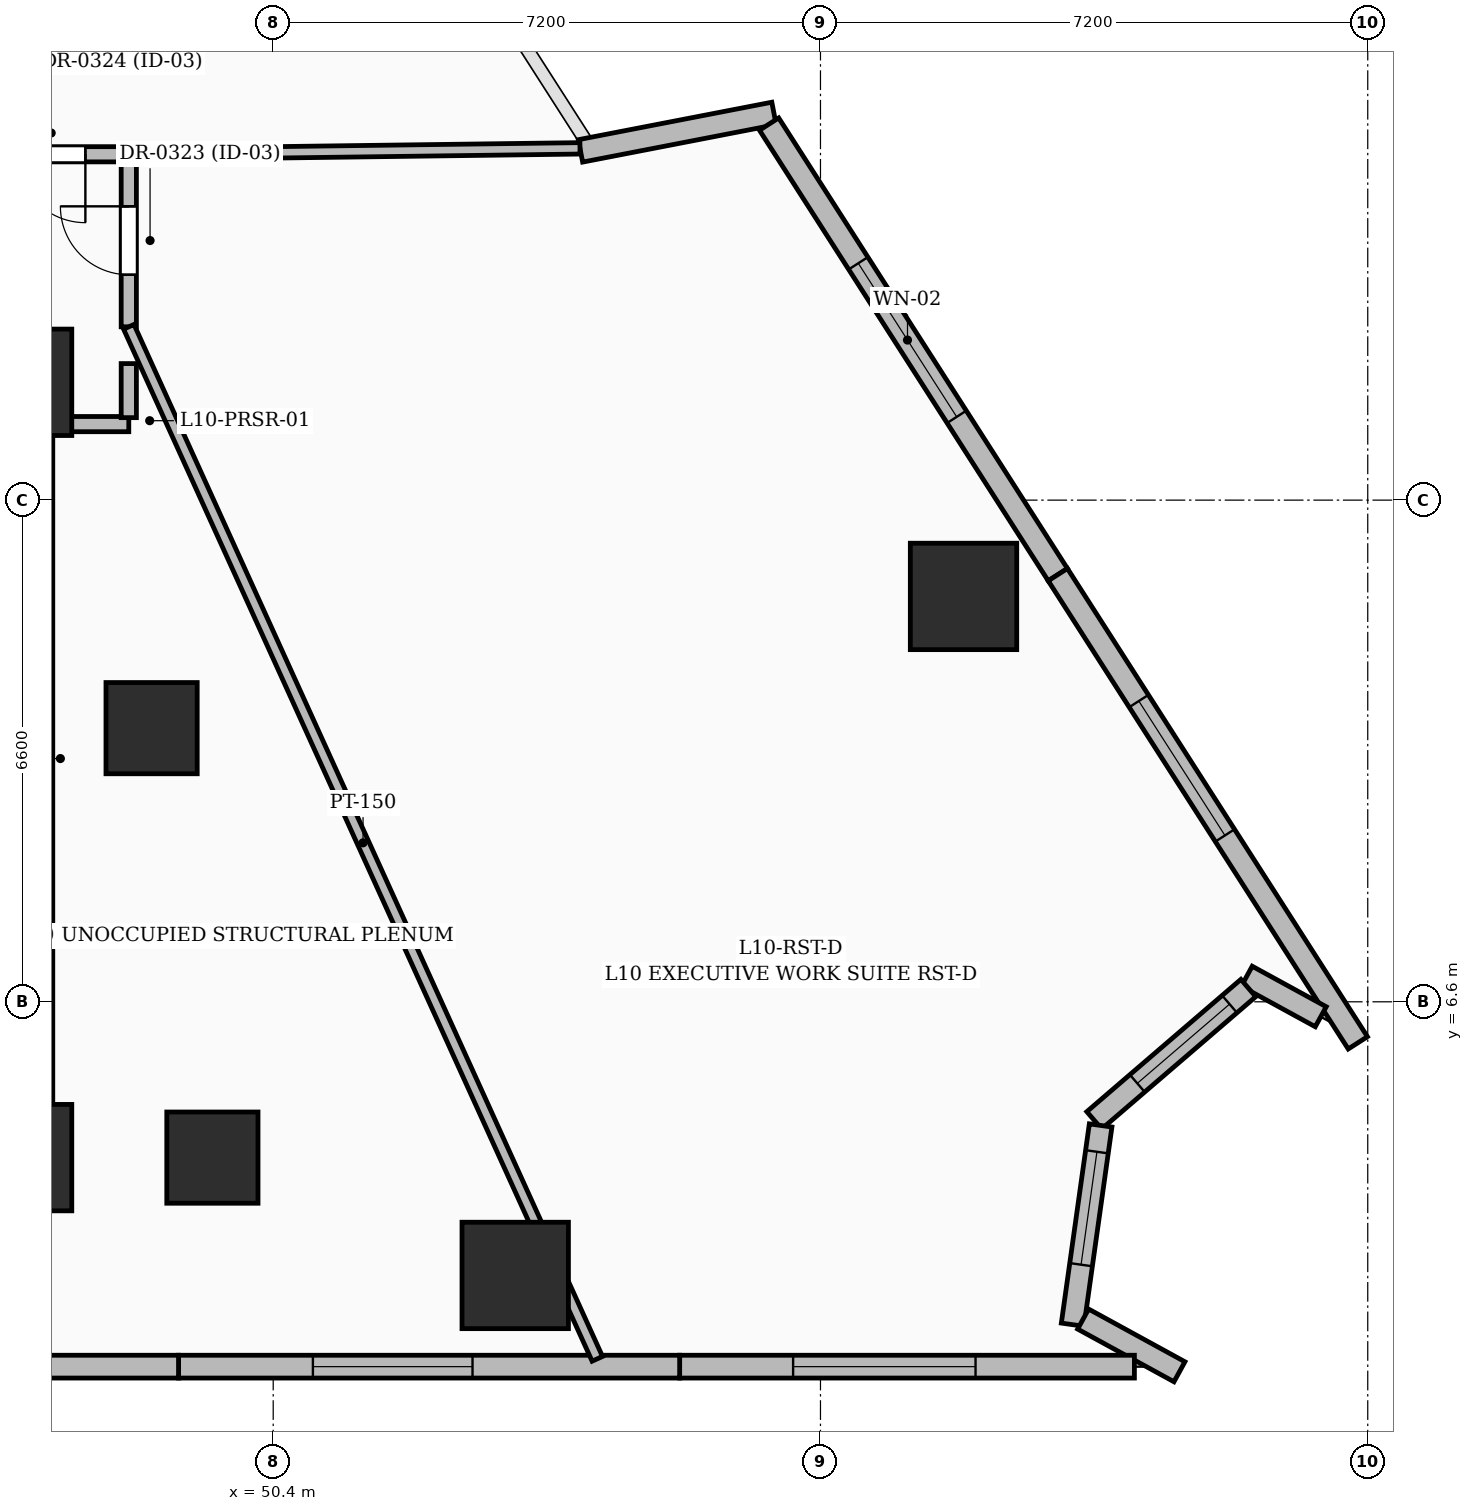
"""IFC4 building model, lengths in metres.
Left out: names, types, materials, properties, quantities, classifications, styles, units other than length and angle.
Written with IfcOpenShell. Run it as: python <this file> out.ifc"""

import sys

from ifc_helpers import new_model, si_unit, direction, frame, frame_2d, origin, origin_2d, place, context, subcontext, project, spatial, rectangle, extrude, element, fill, save


model = new_model("IFC4")
c1 = context("Model", 3, precision=1e-05, world=origin(), true_north=direction((0.0, 1.0)))
c2 = subcontext(c1, "Body", "Model", "MODEL_VIEW")
j1 = project(units=[si_unit("LENGTHUNIT", "METRE"), si_unit("PLANEANGLEUNIT", "RADIAN")], contexts=[c1])
p1 = place(None, origin())
s1 = spatial("IfcSite", under=j1, at=p1, CompositionType="ELEMENT")
p2 = place(p1, origin())
s2 = spatial("IfcBuilding", under=s1, at=p2, CompositionType="ELEMENT")
p3 = place(p2, frame((0.0, 0.0, 46.2)))
s3 = spatial("IfcBuildingStorey", under=s2, at=p3, CompositionType="ELEMENT", Elevation=46.2)
for number, where, z_axis, x_axis in (
    (1, (47.05, 4.55, 0.0), (0.0, 0.0, 1.0), (1.0, 0.0, 0.0)),
    (2, (47.05, 14.75, 0.0), (0.0, 0.0, 1.0), (1.0, 0.0, 0.0)),
):
    element("IfcColumn", number, at=place(p3, frame(where, z_axis=z_axis, x_axis=x_axis)), inside=s3, PredefinedType="COLUMN", context=c2, shape_type="SweptSolid", body=[
        extrude(rectangle(XDim=1.4, YDim=1.4, at=origin_2d()), origin(), (0.0, 0.0, 1.0), 3.6),
    ])
for number, where, z_axis, x_axis in (
    (3, (49.6, 4.55, 0.0), (0.0, 0.0, 1.0), (1.0, 0.0, 0.0)),
    (4, (48.8, 10.2, 0.0), (0.0, 0.0, 1.0), (1.0, 0.0, 0.0)),
):
    element("IfcColumn", number, at=place(p3, frame(where, z_axis=z_axis, x_axis=x_axis)), inside=s3, PredefinedType="COLUMN", context=c2, shape_type="SweptSolid", body=[
        extrude(rectangle(XDim=1.2, YDim=1.2, at=origin_2d()), origin(), (0.0, 0.0, 1.0), 3.6),
    ])
for number, where, z_axis, x_axis in (
    (5, (53.584, 3.0, 0.0), (0.0, 0.0, 1.0), (1.0, 0.0, 0.0)),
    (6, (59.482, 11.933, 0.0), (0.0, 0.0, 1.0), (1.0, 0.0, 0.0)),
):
    element("IfcColumn", number, at=place(p3, frame(where, z_axis=z_axis, x_axis=x_axis)), inside=s3, PredefinedType="COLUMN", context=c2, shape_type="SweptSolid", body=[
        extrude(rectangle(XDim=1.4, YDim=1.4, at=origin_2d()), origin(), (0.0, 0.0, 1.0), 3.6),
    ])
p4 = place(p3, frame((54.443, 17.794, 0.0), z_axis=(0.0, 0.0, 1.0), x_axis=(0.981746971615, 0.190191702567, 0.0)))
e7 = element("IfcWall", 7, at=p4, inside=s3, PredefinedType="SOLIDWALL", context=c2, shape_type="SweptSolid", body=[
    extrude(rectangle(XDim=2.593, YDim=0.3, at=frame_2d((1.296, 0.0))), origin(), (0.0, 0.0, 1.0), 2.375),
])
p5 = place(p3, frame((56.924, 18.147, 0.0), z_axis=(0.0, 0.0, 1.0), x_axis=(0.539524946774, -0.84196961454, 0.0)))
e8 = element("IfcWall", 8, at=p5, inside=s3, PredefinedType="SOLIDWALL", context=c2, shape_type="SweptSolid", body=[
    extrude(rectangle(XDim=7.041, YDim=0.3, at=frame_2d((3.52, 0.0))), origin(), (0.0, 0.0, 1.0), 3.35),
])
p6 = place(p5, frame((2.175, 0.0, 0.6)))
e9 = element("IfcOpeningElement", 9, at=p6, cuts=e8, PredefinedType="OPENING", context=c2, shape_type="SweptSolid", body=[
    extrude(rectangle(XDim=2.4, YDim=2.1, at=frame_2d((1.2, 1.05))), frame((0.0, 0.16, 0.0), z_axis=(0.0, -1.0, 0.0), x_axis=(1.0, 0.0, 0.0)), (0.0, 0.0, 1.0), 0.32),
])
p7 = place(p3, frame((60.722, 12.219, 0.0), z_axis=(0.0, 0.0, 1.0), x_axis=(0.53953753152, -0.841961550239, 0.0)))
e10 = element("IfcWall", 10, at=p7, inside=s3, PredefinedType="SOLIDWALL", context=c2, shape_type="SweptSolid", body=[
    extrude(rectangle(XDim=7.316, YDim=0.3, at=frame_2d((3.658, 0.0))), origin(), (0.0, 0.0, 1.0), 3.35),
])
p8 = place(p7, frame((1.975, 0.0, 0.55)))
e11 = element("IfcOpeningElement", 11, at=p8, cuts=e10, PredefinedType="OPENING", context=c2, shape_type="SweptSolid", body=[
    extrude(rectangle(XDim=2.1, YDim=2.4, at=frame_2d((1.05, 1.2))), frame((0.0, 0.16, 0.0), z_axis=(0.0, -1.0, 0.0), x_axis=(1.0, 0.0, 0.0)), (0.0, 0.0, 1.0), 0.32),
])
p9 = place(p3, frame((64.182, 6.404, 0.0), z_axis=(0.0, 0.0, 1.0), x_axis=(-0.877222032341, 0.48008489455, 0.0)))
e12 = element("IfcWall", 12, at=p9, inside=s3, PredefinedType="SOLIDWALL", context=c2, shape_type="SweptSolid", body=[
    extrude(rectangle(XDim=1.11, YDim=0.3, at=frame_2d((0.555, 0.0))), origin(), (0.0, 0.0, 1.0), 3.35),
])
p10 = place(p3, frame((63.229, 6.781, 0.0), z_axis=(0.0, 0.0, 1.0), x_axis=(-0.7586756687, -0.651468517829, 0.0)))
e13 = element("IfcWall", 13, at=p10, inside=s3, PredefinedType="SOLIDWALL", context=c2, shape_type="SweptSolid", body=[
    extrude(rectangle(XDim=2.671, YDim=0.3, at=frame_2d((1.335, 0.0))), origin(), (0.0, 0.0, 1.0), 3.35),
])
p11 = place(p10, frame((0.325, 0.0, 0.55)))
e14 = element("IfcOpeningElement", 14, at=p11, cuts=e13, PredefinedType="OPENING", context=c2, shape_type="SweptSolid", body=[
    extrude(rectangle(XDim=1.6, YDim=2.2, at=frame_2d((0.8, 1.1))), frame((0.0, 0.16, 0.0), z_axis=(0.0, -1.0, 0.0), x_axis=(1.0, 0.0, 0.0)), (0.0, 0.0, 1.0), 0.32),
])
p12 = place(p3, frame((61.286, 4.973, 0.0), z_axis=(0.0, 0.0, 1.0), x_axis=(-0.139186994148, -0.990266116082, 0.0)))
e15 = element("IfcWall", 15, at=p12, inside=s3, PredefinedType="SOLIDWALL", context=c2, shape_type="SweptSolid", body=[
    extrude(rectangle(XDim=2.647, YDim=0.3, at=frame_2d((1.323, 0.0))), origin(), (0.0, 0.0, 1.0), 3.35),
])
p13 = place(p12, frame((0.35, 0.0, 0.6)))
e16 = element("IfcOpeningElement", 16, at=p13, cuts=e15, PredefinedType="OPENING", context=c2, shape_type="SweptSolid", body=[
    extrude(rectangle(XDim=1.5, YDim=2.1, at=frame_2d((0.75, 1.05))), frame((0.0, 0.16, 0.0), z_axis=(0.0, -1.0, 0.0), x_axis=(1.0, 0.0, 0.0)), (0.0, 0.0, 1.0), 0.32),
])
p14 = place(p3, frame((61.055, 2.426, 0.0), z_axis=(0.0, 0.0, 1.0), x_axis=(0.877287752989, -0.479964788767, 0.0)))
e17 = element("IfcWall", 17, at=p14, inside=s3, PredefinedType="SOLIDWALL", context=c2, shape_type="SweptSolid", body=[
    extrude(rectangle(XDim=1.445, YDim=0.3, at=frame_2d((0.722, 0.0))), origin(), (0.0, 0.0, 1.0), 3.35),
])
p15 = place(p3, frame((61.73, 1.8, 0.0), z_axis=(0.0, 0.0, 1.0), x_axis=(-1.0, 0.0, 0.0)))
e18 = element("IfcWall", 18, at=p15, inside=s3, PredefinedType="SOLIDWALL", context=c2, shape_type="SweptSolid", body=[
    extrude(rectangle(XDim=5.983, YDim=0.3, at=frame_2d((2.991, 0.0))), origin(), (0.0, 0.0, 1.0), 3.35),
])
p16 = place(p15, frame((2.09, 0.0, 0.6)))
e19 = element("IfcOpeningElement", 19, at=p16, cuts=e18, PredefinedType="OPENING", context=c2, shape_type="SweptSolid", body=[
    extrude(rectangle(XDim=2.4, YDim=2.1, at=frame_2d((1.2, 1.05))), frame((0.0, 0.16, 0.0), z_axis=(0.0, -1.0, 0.0), x_axis=(1.0, 0.0, 0.0)), (0.0, 0.0, 1.0), 0.32),
])
p17 = place(p3, frame((55.747, 1.8, 0.0), z_axis=(0.0, 0.0, 1.0), x_axis=(-1.0, 0.0, 0.0)))
e20 = element("IfcWall", 20, at=p17, inside=s3, PredefinedType="SOLIDWALL", context=c2, shape_type="SweptSolid", body=[
    extrude(rectangle(XDim=6.593, YDim=0.3, at=frame_2d((3.296, 0.0))), origin(), (0.0, 0.0, 1.0), 3.35),
])
p18 = place(p17, frame((2.725, 0.0, 0.55)))
e21 = element("IfcOpeningElement", 21, at=p18, cuts=e20, PredefinedType="OPENING", context=c2, shape_type="SweptSolid", body=[
    extrude(rectangle(XDim=2.1, YDim=2.4, at=frame_2d((1.05, 1.2))), frame((0.0, 0.16, 0.0), z_axis=(0.0, -1.0, 0.0), x_axis=(1.0, 0.0, 0.0)), (0.0, 0.0, 1.0), 0.32),
])
p19 = place(p3, frame((49.154, 1.8, 0.0), z_axis=(0.0, 0.0, 1.0), x_axis=(-1.0, 0.0, 0.0)))
e22 = element("IfcWall", 22, at=p19, inside=s3, PredefinedType="SOLIDWALL", context=c2, shape_type="SweptSolid", body=[
    extrude(rectangle(XDim=6.593, YDim=0.3, at=frame_2d((3.296, 0.0))), origin(), (0.0, 0.0, 1.0), 3.35),
])
p20 = place(p19, frame((2.375, 0.0, 0.6)))
e23 = element("IfcOpeningElement", 23, at=p20, cuts=e22, PredefinedType="OPENING", context=c2, shape_type="SweptSolid", body=[
    extrude(rectangle(XDim=1.8, YDim=2.1, at=frame_2d((0.9, 1.05))), frame((0.0, 0.16, 0.0), z_axis=(0.0, -1.0, 0.0), x_axis=(1.0, 0.0, 0.0)), (0.0, 0.0, 1.0), 0.32),
])
p21 = place(p3, frame((47.5, 14.2, 0.0), z_axis=(0.0, 0.0, 1.0), x_axis=(1.0, 0.0, 0.0)))
e24 = element("IfcWall", 24, at=p21, inside=s3, PredefinedType="PARTITIONING", context=c2, shape_type="SweptSolid", body=[
    extrude(rectangle(XDim=1.0, YDim=0.2, at=frame_2d((0.5, 0.0))), origin(), (0.0, 0.0, 1.0), 3.35),
])
p22 = place(p3, frame((48.5, 14.285, 0.0), z_axis=(0.0, 0.0, 1.0), x_axis=(0.0, 1.0, 0.0)))
e25 = element("IfcWall", 25, at=p22, inside=s3, PredefinedType="PARTITIONING", context=c2, shape_type="SweptSolid", body=[
    extrude(rectangle(XDim=0.711, YDim=0.2, at=frame_2d((0.355, 0.0))), origin(), (0.0, 0.0, 1.0), 3.35),
])
p23 = place(p3, frame((48.5, 15.48, 0.0), z_axis=(0.0, 0.0, 1.0), x_axis=(0.0, 1.0, 0.0)))
e26 = element("IfcWall", 26, at=p23, inside=s3, PredefinedType="PARTITIONING", context=c2, shape_type="SweptSolid", body=[
    extrude(rectangle(XDim=2.27, YDim=0.2, at=frame_2d((1.135, 0.0))), origin(), (0.0, 0.0, 1.0), 2.279),
])
p24 = place(p23, frame((0.685, 0.0, 0.0)))
e27 = element("IfcOpeningElement", 27, at=p24, cuts=e26, PredefinedType="OPENING", context=c2, shape_type="SweptSolid", body=[
    extrude(rectangle(XDim=0.9, YDim=2.1, at=frame_2d((0.45, 1.05))), frame((0.0, 0.11, 0.0), z_axis=(0.0, -1.0, 0.0), x_axis=(1.0, 0.0, 0.0)), (0.0, 0.0, 1.0), 0.22),
])
p25 = place(p3, frame((48.415, 17.75, 0.0), z_axis=(0.0, 0.0, 1.0), x_axis=(-1.0, 0.0, 0.0)))
e28 = element("IfcWall", 28, at=p25, inside=s3, PredefinedType="PARTITIONING", context=c2, shape_type="SweptSolid", body=[
    extrude(rectangle(XDim=2.065, YDim=0.2, at=frame_2d((1.032, 0.0))), origin(), (0.0, 0.0, 1.0), 2.86),
])
p26 = place(p25, frame((0.486, 0.0, 0.0)))
e29 = element("IfcOpeningElement", 29, at=p26, cuts=e28, PredefinedType="OPENING", context=c2, shape_type="SweptSolid", body=[
    extrude(rectangle(XDim=0.9, YDim=2.1, at=frame_2d((0.45, 1.05))), frame((0.0, 0.11, 0.0), z_axis=(0.0, -1.0, 0.0), x_axis=(1.0, 0.0, 0.0)), (0.0, 0.0, 1.0), 0.22),
])
p27 = place(p3, frame((54.664, 1.903, 0.0), z_axis=(0.0, 0.0, 1.0), x_axis=(-0.413399508634, 0.910549749471, 0.0)))
e30 = element("IfcWall", 30, at=p27, inside=s3, PredefinedType="PARTITIONING", context=c2, shape_type="SweptSolid", body=[
    extrude(rectangle(XDim=14.911, YDim=0.15, at=frame_2d((7.455, 0.0))), origin(), (0.0, 0.0, 1.0), 2.279),
])
p28 = place(p3, frame((54.436, 17.828, 0.0), z_axis=(0.0, 0.0, 1.0), x_axis=(-0.999914181231, -0.013100769962, 0.0)))
e31 = element("IfcWall", 31, at=p28, inside=s3, PredefinedType="PARTITIONING", context=c2, shape_type="SweptSolid", body=[
    extrude(rectangle(XDim=5.852, YDim=0.15, at=frame_2d((2.926, 0.0))), origin(), (0.0, 0.0, 1.0), 2.279),
])
p29 = place(p6, origin())
e32 = element("IfcWindow", 32, at=p29, inside=s3, PartitioningType="SINGLE_PANEL", PredefinedType="WINDOW", context=c2, shape_type="SweptSolid", body=[
    extrude(rectangle(XDim=2.4, YDim=2.1, at=frame_2d((1.2, 1.05))), frame((0.0, 0.03, 0.0), z_axis=(0.0, -1.0, 0.0), x_axis=(1.0, 0.0, 0.0)), (0.0, 0.0, 1.0), 0.06),
])
fill(e9, e32)
p30 = place(p8, origin())
e33 = element("IfcWindow", 33, at=p30, inside=s3, PartitioningType="SINGLE_PANEL", PredefinedType="WINDOW", context=c2, shape_type="SweptSolid", body=[
    extrude(rectangle(XDim=2.1, YDim=2.4, at=frame_2d((1.05, 1.2))), frame((0.0, 0.03, 0.0), z_axis=(0.0, -1.0, 0.0), x_axis=(1.0, 0.0, 0.0)), (0.0, 0.0, 1.0), 0.06),
])
fill(e11, e33)
p31 = place(p11, origin())
e34 = element("IfcWindow", 34, at=p31, inside=s3, PartitioningType="SINGLE_PANEL", PredefinedType="WINDOW", context=c2, shape_type="SweptSolid", body=[
    extrude(rectangle(XDim=1.6, YDim=2.2, at=frame_2d((0.8, 1.1))), frame((0.0, 0.03, 0.0), z_axis=(0.0, -1.0, 0.0), x_axis=(1.0, 0.0, 0.0)), (0.0, 0.0, 1.0), 0.06),
])
fill(e14, e34)
p32 = place(p13, origin())
e35 = element("IfcWindow", 35, at=p32, inside=s3, PartitioningType="SINGLE_PANEL", PredefinedType="WINDOW", context=c2, shape_type="SweptSolid", body=[
    extrude(rectangle(XDim=1.5, YDim=2.1, at=frame_2d((0.75, 1.05))), frame((0.0, 0.03, 0.0), z_axis=(0.0, -1.0, 0.0), x_axis=(1.0, 0.0, 0.0)), (0.0, 0.0, 1.0), 0.06),
])
fill(e16, e35)
p33 = place(p16, origin())
e36 = element("IfcWindow", 36, at=p33, inside=s3, PartitioningType="SINGLE_PANEL", PredefinedType="WINDOW", context=c2, shape_type="SweptSolid", body=[
    extrude(rectangle(XDim=2.4, YDim=2.1, at=frame_2d((1.2, 1.05))), frame((0.0, 0.03, 0.0), z_axis=(0.0, -1.0, 0.0), x_axis=(1.0, 0.0, 0.0)), (0.0, 0.0, 1.0), 0.06),
])
fill(e19, e36)
p34 = place(p18, origin())
e37 = element("IfcWindow", 37, at=p34, inside=s3, PartitioningType="SINGLE_PANEL", PredefinedType="WINDOW", context=c2, shape_type="SweptSolid", body=[
    extrude(rectangle(XDim=2.1, YDim=2.4, at=frame_2d((1.05, 1.2))), frame((0.0, 0.03, 0.0), z_axis=(0.0, -1.0, 0.0), x_axis=(1.0, 0.0, 0.0)), (0.0, 0.0, 1.0), 0.06),
])
fill(e21, e37)
p35 = place(p24, origin())
e38 = element("IfcDoor", 38, at=p35, inside=s3, OperationType="SINGLE_SWING_RIGHT", PredefinedType="DOOR", context=c2, shape_type="SweptSolid", body=[
    extrude(rectangle(XDim=0.9, YDim=2.1, at=frame_2d((0.45, 1.05))), frame((0.0, 0.025, 0.0), z_axis=(0.0, -1.0, 0.0), x_axis=(1.0, 0.0, 0.0)), (0.0, 0.0, 1.0), 0.05),
])
fill(e27, e38)
p36 = place(p26, origin())
e39 = element("IfcDoor", 39, at=p36, inside=s3, OperationType="SINGLE_SWING_LEFT", PredefinedType="DOOR", context=c2, shape_type="SweptSolid", body=[
    extrude(rectangle(XDim=0.9, YDim=2.1, at=frame_2d((0.45, 1.05))), frame((0.0, 0.025, 0.0), z_axis=(0.0, -1.0, 0.0), x_axis=(1.0, 0.0, 0.0)), (0.0, 0.0, 1.0), 0.05),
])
fill(e29, e39)
save(model, sys.argv[1])
